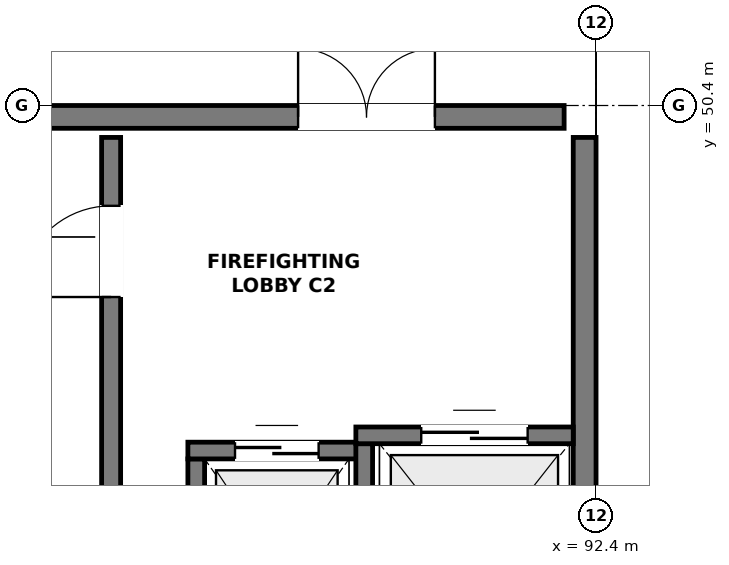
"""IFC4 building model, lengths in metres.
Left out: names, types, materials, properties, quantities, classifications, styles, units other than length and angle.
Written with IfcOpenShell. Run it as: python <this file> out.ifc"""

import sys

from ifc_helpers import new_model, si_unit, direction, frame, frame_2d, origin, place, context, subcontext, project, spatial, rectangle, extrude, element, fill, save


model = new_model("IFC4")
c1 = context("Model", 3, precision=1e-05, world=origin(), true_north=direction((0.0, 1.0)))
c2 = subcontext(c1, "Body", "Model", "MODEL_VIEW")
j1 = project(units=[si_unit("LENGTHUNIT", "METRE"), si_unit("PLANEANGLEUNIT", "RADIAN")], contexts=[c1])
p1 = place(None, origin())
s1 = spatial("IfcSite", under=j1, at=p1, CompositionType="ELEMENT")
p2 = place(p1, origin())
s2 = spatial("IfcBuilding", under=s1, at=p2, CompositionType="ELEMENT")
p3 = place(p2, frame((0.0, 0.0, 18.3)))
s3 = spatial("IfcBuildingStorey", under=s2, at=p3, CompositionType="ELEMENT", Elevation=18.3)
p4 = place(p3, frame((76.02, 50.25, 0.0), z_axis=(0.0, 0.0, 1.0), x_axis=(1.0, 0.0, 0.0)))
e1 = element("IfcWall", 1, at=p4, inside=s3, PredefinedType="SHEAR", context=c2, shape_type="SweptSolid", body=[
    extrude(rectangle(XDim=15.96, YDim=0.3, at=frame_2d((7.98, 0.0))), origin(), (0.0, 0.0, 1.0), 3.04),
])
p5 = place(p4, frame((12.46, 0.0, 0.0)))
e2 = element("IfcOpeningElement", 2, at=p5, cuts=e1, PredefinedType="OPENING", context=c2, shape_type="SweptSolid", body=[
    extrude(rectangle(XDim=1.8, YDim=2.2, at=frame_2d((0.9, 1.1))), frame((0.0, 0.162, 0.0), z_axis=(0.0, -1.0, 0.0), x_axis=(1.0, 0.0, 0.0)), (0.0, 0.0, 1.0), 0.324),
])
p6 = place(p3, frame((92.25, 42.42, 0.0), z_axis=(0.0, 0.0, 1.0), x_axis=(0.0, 1.0, 0.0)))
e3 = element("IfcWall", 3, at=p6, inside=s3, PredefinedType="SHEAR", context=c2, shape_type="SweptSolid", body=[
    extrude(rectangle(XDim=7.56, YDim=0.3, at=frame_2d((3.78, 0.0))), origin(), (0.0, 0.0, 1.0), 3.04),
])
p7 = place(p3, frame((86.02, 42.42, 0.0), z_axis=(0.0, 0.0, 1.0), x_axis=(0.0, 1.0, 0.0)))
e4 = element("IfcWall", 4, at=p7, inside=s3, PredefinedType="SHEAR", context=c2, shape_type="SweptSolid", body=[
    extrude(rectangle(XDim=7.56, YDim=0.25, at=frame_2d((3.78, 0.0))), origin(), (0.0, 0.0, 1.0), 3.04),
])
p8 = place(p7, frame((5.46, 0.0, 0.0)))
e5 = element("IfcOpeningElement", 5, at=p8, cuts=e4, PredefinedType="OPENING", context=c2, shape_type="SweptSolid", body=[
    extrude(rectangle(XDim=1.2, YDim=2.2, at=frame_2d((0.6, 1.1))), frame((0.0, 0.137, 0.0), z_axis=(0.0, -1.0, 0.0), x_axis=(1.0, 0.0, 0.0)), (0.0, 0.0, 1.0), 0.274),
])
p9 = place(p3, frame((87.14, 43.05, 0.0), z_axis=(0.0, 0.0, 1.0), x_axis=(0.0, 1.0, 0.0)))
e6 = element("IfcWall", 6, at=p9, inside=s3, PredefinedType="SOLIDWALL", context=c2, shape_type="SweptSolid", body=[
    extrude(rectangle(XDim=2.7, YDim=0.22, at=frame_2d((1.35, 0.0))), origin(), (0.0, 0.0, 1.0), 3.04),
])
p10 = place(p3, frame((87.03, 45.86, 0.0), z_axis=(0.0, 0.0, 1.0), x_axis=(1.0, 0.0, 0.0)))
e7 = element("IfcWall", 7, at=p10, inside=s3, PredefinedType="SOLIDWALL", context=c2, shape_type="SweptSolid", body=[
    extrude(rectangle(XDim=2.43, YDim=0.22, at=frame_2d((1.215, 0.0))), origin(), (0.0, 0.0, 1.0), 3.04),
])
p11 = place(p10, frame((0.62, 0.0, 0.0)))
e8 = element("IfcOpeningElement", 8, at=p11, cuts=e7, PredefinedType="OPENING", context=c2, shape_type="SweptSolid", body=[
    extrude(rectangle(XDim=1.1, YDim=2.15, at=frame_2d((0.55, 1.075))), frame((0.0, 0.122, 0.0), z_axis=(0.0, -1.0, 0.0), x_axis=(1.0, 0.0, 0.0)), (0.0, 0.0, 1.0), 0.244),
])
p12 = place(p3, frame((89.35, 42.85, 0.0), z_axis=(0.0, 0.0, 1.0), x_axis=(0.0, 1.0, 0.0)))
e9 = element("IfcWall", 9, at=p12, inside=s3, PredefinedType="SOLIDWALL", context=c2, shape_type="SweptSolid", body=[
    extrude(rectangle(XDim=3.1, YDim=0.22, at=frame_2d((1.55, 0.0))), origin(), (0.0, 0.0, 1.0), 3.04),
])
p13 = place(p3, frame((89.24, 46.06, 0.0), z_axis=(0.0, 0.0, 1.0), x_axis=(1.0, 0.0, 0.0)))
e10 = element("IfcWall", 10, at=p13, inside=s3, PredefinedType="SOLIDWALL", context=c2, shape_type="SweptSolid", body=[
    extrude(rectangle(XDim=2.86, YDim=0.22, at=frame_2d((1.43, 0.0))), origin(), (0.0, 0.0, 1.0), 3.04),
])
p14 = place(p13, frame((0.86, 0.0, 0.0)))
e11 = element("IfcOpeningElement", 11, at=p14, cuts=e10, PredefinedType="OPENING", context=c2, shape_type="SweptSolid", body=[
    extrude(rectangle(XDim=1.4, YDim=2.2, at=frame_2d((0.7, 1.1))), frame((0.0, 0.122, 0.0), z_axis=(0.0, -1.0, 0.0), x_axis=(1.0, 0.0, 0.0)), (0.0, 0.0, 1.0), 0.244),
])
p15 = place(p5, origin())
e12 = element("IfcDoor", 12, at=p15, inside=s3, OperationType="DOUBLE_DOOR_SINGLE_SWING", PredefinedType="DOOR", context=c2, shape_type="SweptSolid", body=[
    extrude(rectangle(XDim=1.8, YDim=2.2, at=frame_2d((0.9, 1.1))), frame((0.0, 0.025, 0.0), z_axis=(0.0, -1.0, 0.0), x_axis=(1.0, 0.0, 0.0)), (0.0, 0.0, 1.0), 0.05),
])
fill(e2, e12)
p16 = place(p8, origin())
e13 = element("IfcDoor", 13, at=p16, inside=s3, OperationType="SINGLE_SWING_LEFT", PredefinedType="DOOR", context=c2, shape_type="SweptSolid", body=[
    extrude(rectangle(XDim=1.2, YDim=2.2, at=frame_2d((0.6, 1.1))), frame((0.0, 0.025, 0.0), z_axis=(0.0, -1.0, 0.0), x_axis=(1.0, 0.0, 0.0)), (0.0, 0.0, 1.0), 0.05),
])
fill(e5, e13)
p17 = place(p11, origin())
e14 = element("IfcDoor", 14, at=p17, inside=s3, OperationType="DOUBLE_DOOR_SLIDING", PredefinedType="DOOR", context=c2, shape_type="SweptSolid", body=[
    extrude(rectangle(XDim=1.1, YDim=2.15, at=frame_2d((0.55, 1.075))), frame((0.0, 0.025, 0.0), z_axis=(0.0, -1.0, 0.0), x_axis=(1.0, 0.0, 0.0)), (0.0, 0.0, 1.0), 0.05),
])
fill(e8, e14)
p18 = place(p14, origin())
e15 = element("IfcDoor", 15, at=p18, inside=s3, OperationType="DOUBLE_DOOR_SLIDING", PredefinedType="DOOR", context=c2, shape_type="SweptSolid", body=[
    extrude(rectangle(XDim=1.4, YDim=2.2, at=frame_2d((0.7, 1.1))), frame((0.0, 0.025, 0.0), z_axis=(0.0, -1.0, 0.0), x_axis=(1.0, 0.0, 0.0)), (0.0, 0.0, 1.0), 0.05),
])
fill(e11, e15)
save(model, sys.argv[1])
